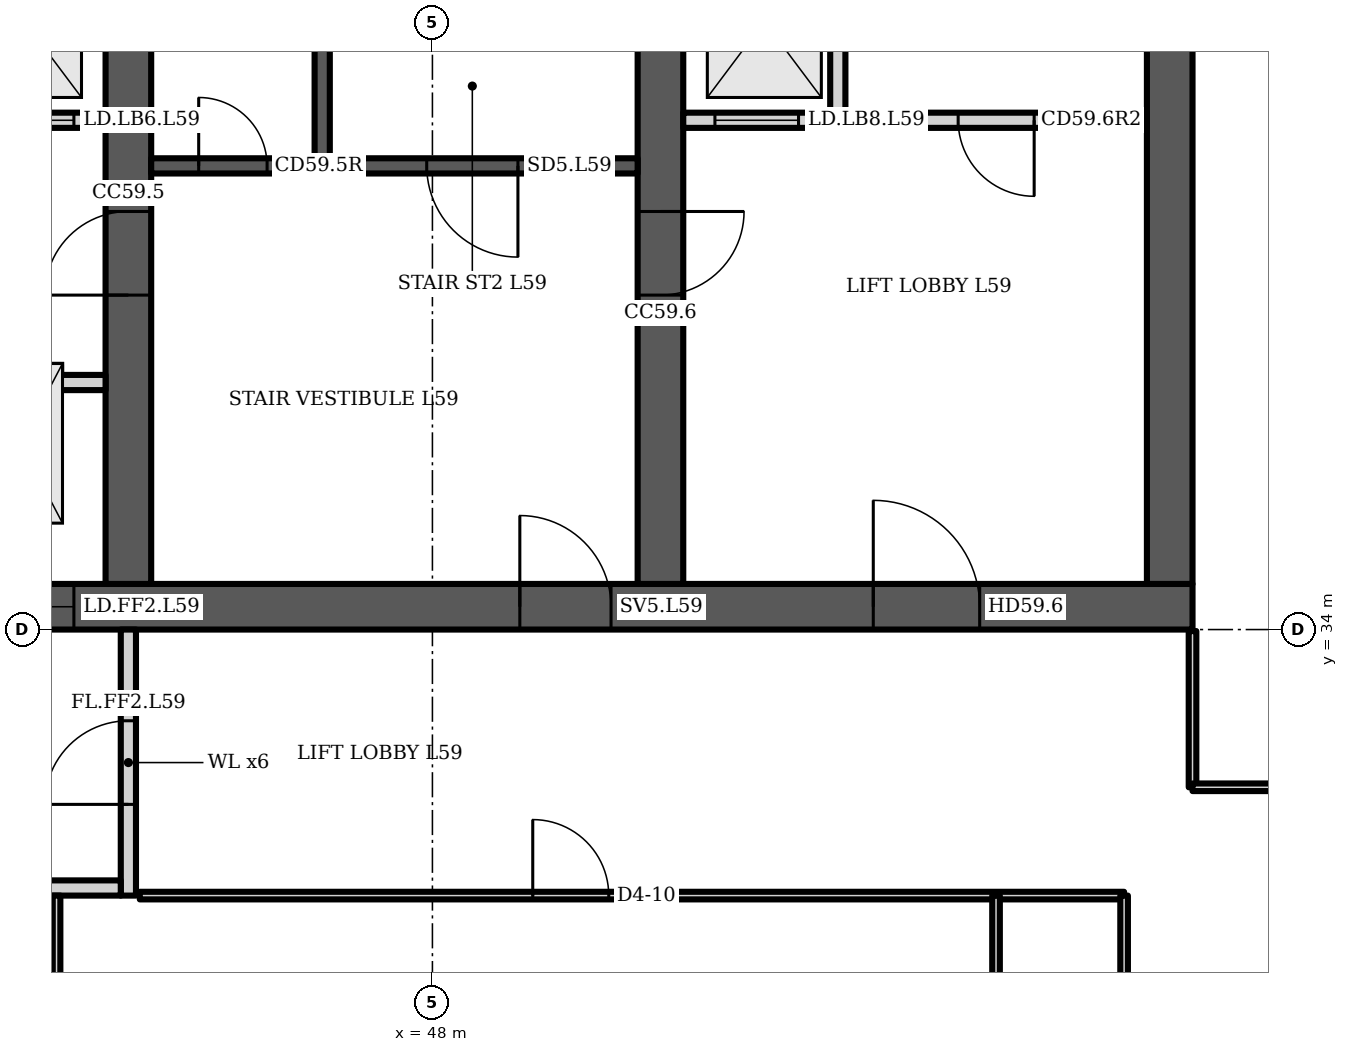
"""IFC4 building model, lengths in metres.
Left out: names, types, materials, properties, quantities, classifications, styles, units other than length and angle.
Written with IfcOpenShell. Run it as: python <this file> out.ifc"""

import sys

from ifc_helpers import new_model, si_unit, direction, frame, frame_2d, origin, place, context, subcontext, project, spatial, polyline, rectangle, outline, extrude, element, fill, save


model = new_model("IFC4")
c1 = context("Model", 3, precision=1e-05, world=origin(), true_north=direction((0.0, 1.0)))
c2 = subcontext(c1, "Body", "Model", "MODEL_VIEW")
j1 = project(units=[si_unit("LENGTHUNIT", "METRE"), si_unit("PLANEANGLEUNIT", "RADIAN")], contexts=[c1])
p1 = place(None, origin())
s1 = spatial("IfcSite", under=j1, at=p1, CompositionType="ELEMENT")
p2 = place(p1, origin())
s2 = spatial("IfcBuilding", under=s1, at=p2, CompositionType="ELEMENT")
p3 = place(p2, frame((0.0, 0.0, 235.9)))
s3 = spatial("IfcBuildingStorey", under=s2, at=p3, CompositionType="ELEMENT", Elevation=235.9)
p4 = place(p3, frame((23.0, 34.3, 0.0), z_axis=(0.0, 0.0, 1.0), x_axis=(1.0, 0.0, 0.0)))
e1 = element("IfcWall", 1, at=p4, inside=s3, PredefinedType="SHEAR", context=c2, shape_type="SweptSolid", body=[
    extrude(rectangle(XDim=35.0, YDim=0.6, at=frame_2d((17.5, 0.0))), origin(), (0.0, 0.0, 1.0), 3.6),
])
p5 = place(p4, frame((0.65, 0.0, 0.0)))
e2 = element("IfcOpeningElement", 2, at=p5, cuts=e1, PredefinedType="OPENING", context=c2, shape_type="SweptSolid", body=[
    extrude(rectangle(XDim=1.2, YDim=2.1, at=frame_2d((0.6, 1.05))), frame((0.0, 0.31, 0.0), z_axis=(0.0, -1.0, 0.0), x_axis=(1.0, 0.0, 0.0)), (0.0, 0.0, 1.0), 0.62),
])
p6 = place(p4, frame((7.717, 0.0, 0.0)))
e3 = element("IfcOpeningElement", 3, at=p6, cuts=e1, PredefinedType="OPENING", context=c2, shape_type="SweptSolid", body=[
    extrude(rectangle(XDim=1.1, YDim=2.1, at=frame_2d((0.55, 1.05))), frame((0.0, 0.31, 0.0), z_axis=(0.0, -1.0, 0.0), x_axis=(1.0, 0.0, 0.0)), (0.0, 0.0, 1.0), 0.62),
])
p7 = place(p4, frame((12.183, 0.0, 0.0)))
e4 = element("IfcOpeningElement", 4, at=p7, cuts=e1, PredefinedType="OPENING", context=c2, shape_type="SweptSolid", body=[
    extrude(rectangle(XDim=1.1, YDim=2.1, at=frame_2d((0.55, 1.05))), frame((0.0, 0.31, 0.0), z_axis=(0.0, -1.0, 0.0), x_axis=(1.0, 0.0, 0.0)), (0.0, 0.0, 1.0), 0.62),
])
p8 = place(p4, frame((9.8, 0.0, 0.0)))
e5 = element("IfcOpeningElement", 5, at=p8, cuts=e1, PredefinedType="OPENING", context=c2, shape_type="SweptSolid", body=[
    extrude(rectangle(XDim=1.4, YDim=2.1, at=frame_2d((0.7, 1.05))), frame((0.0, 0.31, 0.0), z_axis=(0.0, -1.0, 0.0), x_axis=(1.0, 0.0, 0.0)), (0.0, 0.0, 1.0), 0.62),
])
p9 = place(p4, frame((14.717, 0.0, 0.0)))
e6 = element("IfcOpeningElement", 6, at=p9, cuts=e1, PredefinedType="OPENING", context=c2, shape_type="SweptSolid", body=[
    extrude(rectangle(XDim=1.1, YDim=2.1, at=frame_2d((0.55, 1.05))), frame((0.0, 0.31, 0.0), z_axis=(0.0, -1.0, 0.0), x_axis=(1.0, 0.0, 0.0)), (0.0, 0.0, 1.0), 0.62),
])
p10 = place(p4, frame((16.95, 0.0, 0.0)))
e7 = element("IfcOpeningElement", 7, at=p10, cuts=e1, PredefinedType="OPENING", context=c2, shape_type="SweptSolid", body=[
    extrude(rectangle(XDim=1.1, YDim=2.1, at=frame_2d((0.55, 1.05))), frame((0.0, 0.31, 0.0), z_axis=(0.0, -1.0, 0.0), x_axis=(1.0, 0.0, 0.0)), (0.0, 0.0, 1.0), 0.62),
])
p11 = place(p4, frame((19.183, 0.0, 0.0)))
e8 = element("IfcOpeningElement", 8, at=p11, cuts=e1, PredefinedType="OPENING", context=c2, shape_type="SweptSolid", body=[
    extrude(rectangle(XDim=1.1, YDim=2.1, at=frame_2d((0.55, 1.05))), frame((0.0, 0.31, 0.0), z_axis=(0.0, -1.0, 0.0), x_axis=(1.0, 0.0, 0.0)), (0.0, 0.0, 1.0), 0.62),
])
p12 = place(p4, frame((26.15, 0.0, 0.0)))
e9 = element("IfcOpeningElement", 9, at=p12, cuts=e1, PredefinedType="OPENING", context=c2, shape_type="SweptSolid", body=[
    extrude(rectangle(XDim=1.2, YDim=2.1, at=frame_2d((0.6, 1.05))), frame((0.0, 0.31, 0.0), z_axis=(0.0, -1.0, 0.0), x_axis=(1.0, 0.0, 0.0)), (0.0, 0.0, 1.0), 0.62),
])
p13 = place(p4, frame((30.8, 0.0, 0.0)))
e10 = element("IfcOpeningElement", 10, at=p13, cuts=e1, PredefinedType="OPENING", context=c2, shape_type="SweptSolid", body=[
    extrude(rectangle(XDim=1.4, YDim=2.1, at=frame_2d((0.7, 1.05))), frame((0.0, 0.31, 0.0), z_axis=(0.0, -1.0, 0.0), x_axis=(1.0, 0.0, 0.0)), (0.0, 0.0, 1.0), 0.62),
])
p14 = place(p3, frame((44.0, 34.6, 0.0), z_axis=(0.0, 0.0, 1.0), x_axis=(0.0, 1.0, 0.0)))
e11 = element("IfcWall", 11, at=p14, inside=s3, PredefinedType="SHEAR", context=c2, shape_type="SweptSolid", body=[
    extrude(rectangle(XDim=14.784, YDim=0.6, at=frame_2d((7.392, 0.0))), origin(), (0.0, 0.0, 1.0), 3.6),
])
p15 = place(p14, frame((11.608, 0.0, 0.0)))
e12 = element("IfcOpeningElement", 12, at=p15, cuts=e11, PredefinedType="OPENING", context=c2, shape_type="SweptSolid", body=[
    extrude(rectangle(XDim=1.0, YDim=2.1, at=frame_2d((0.5, 1.05))), frame((0.0, 0.31, 0.0), z_axis=(0.0, -1.0, 0.0), x_axis=(1.0, 0.0, 0.0)), (0.0, 0.0, 1.0), 0.62),
])
p16 = place(p14, frame((3.8, 0.0, 0.0)))
e13 = element("IfcOpeningElement", 13, at=p16, cuts=e11, PredefinedType="OPENING", context=c2, shape_type="SweptSolid", body=[
    extrude(rectangle(XDim=1.1, YDim=2.1, at=frame_2d((0.55, 1.05))), frame((0.0, 0.31, 0.0), z_axis=(0.0, -1.0, 0.0), x_axis=(1.0, 0.0, 0.0)), (0.0, 0.0, 1.0), 0.62),
])
p17 = place(p3, frame((51.0, 34.6, 0.0), z_axis=(0.0, 0.0, 1.0), x_axis=(0.0, 1.0, 0.0)))
e14 = element("IfcWall", 14, at=p17, inside=s3, PredefinedType="SHEAR", context=c2, shape_type="SweptSolid", body=[
    extrude(rectangle(XDim=14.171, YDim=0.6, at=frame_2d((7.085, 0.0))), origin(), (0.0, 0.0, 1.0), 3.6),
])
p18 = place(p17, frame((3.8, 0.0, 0.0)))
e15 = element("IfcOpeningElement", 15, at=p18, cuts=e14, PredefinedType="OPENING", context=c2, shape_type="SweptSolid", body=[
    extrude(rectangle(XDim=1.1, YDim=2.1, at=frame_2d((0.55, 1.05))), frame((0.0, 0.31, 0.0), z_axis=(0.0, -1.0, 0.0), x_axis=(1.0, 0.0, 0.0)), (0.0, 0.0, 1.0), 0.62),
])
p19 = place(p3, frame((57.7, 34.6, 0.0), z_axis=(0.0, 0.0, 1.0), x_axis=(0.0, 1.0, 0.0)))
e16 = element("IfcWall", 16, at=p19, inside=s3, PredefinedType="SHEAR", context=c2, shape_type="SweptSolid", body=[
    extrude(rectangle(XDim=13.585, YDim=0.6, at=frame_2d((6.792, 0.0))), origin(), (0.0, 0.0, 1.0), 3.6),
])
p20 = place(p3, frame((37.3, 40.7, 0.0), z_axis=(0.0, 0.0, 1.0), x_axis=(1.0, 0.0, 0.0)))
e17 = element("IfcWall", 17, at=p20, inside=s3, PredefinedType="PARTITIONING", context=c2, shape_type="SweptSolid", body=[
    extrude(rectangle(XDim=6.4, YDim=0.2, at=frame_2d((3.2, 0.0))), origin(), (0.0, 0.0, 1.0), 3.2),
])
p21 = place(p20, frame((0.417, 0.0, 0.0)))
e18 = element("IfcOpeningElement", 18, at=p21, cuts=e17, PredefinedType="OPENING", context=c2, shape_type="SweptSolid", body=[
    extrude(rectangle(XDim=1.1, YDim=2.1, at=frame_2d((0.55, 1.05))), frame((0.0, 0.11, 0.0), z_axis=(0.0, -1.0, 0.0), x_axis=(1.0, 0.0, 0.0)), (0.0, 0.0, 1.0), 0.22),
])
p22 = place(p20, frame((2.65, 0.0, 0.0)))
e19 = element("IfcOpeningElement", 19, at=p22, cuts=e17, PredefinedType="OPENING", context=c2, shape_type="SweptSolid", body=[
    extrude(rectangle(XDim=1.1, YDim=2.1, at=frame_2d((0.55, 1.05))), frame((0.0, 0.11, 0.0), z_axis=(0.0, -1.0, 0.0), x_axis=(1.0, 0.0, 0.0)), (0.0, 0.0, 1.0), 0.22),
])
p23 = place(p20, frame((4.883, 0.0, 0.0)))
e20 = element("IfcOpeningElement", 20, at=p23, cuts=e17, PredefinedType="OPENING", context=c2, shape_type="SweptSolid", body=[
    extrude(rectangle(XDim=1.1, YDim=2.1, at=frame_2d((0.55, 1.05))), frame((0.0, 0.11, 0.0), z_axis=(0.0, -1.0, 0.0), x_axis=(1.0, 0.0, 0.0)), (0.0, 0.0, 1.0), 0.22),
])
p24 = place(p3, origin())
e21 = element("IfcWall", 21, at=p24, inside=s3, PredefinedType="PARTITIONING", context=c2, shape_type="SweptSolid", body=[
    extrude(outline(polyline([(41.567, 37.1), (39.433, 37.1), (39.433, 34.6), (39.233, 34.6), (39.233, 37.45), (37.3, 37.45), (37.3, 37.65), (39.233, 37.65), (39.433, 37.65), (39.433, 37.3), (41.567, 37.3), (41.567, 37.35), (41.767, 37.35), (43.7, 37.35), (43.7, 37.15), (41.767, 37.15), (41.767, 34.6), (41.567, 34.6), (41.567, 37.1)])), origin(), (0.0, 0.0, 1.0), 3.2),
])
p25 = place(p3, origin())
e22 = element("IfcWall", 22, at=p25, inside=s3, PredefinedType="PARTITIONING", context=c2, shape_type="SweptSolid", body=[
    extrude(outline(polyline([(39.433, 40.8), (39.233, 40.8), (39.233, 43.8), (37.3, 43.8), (37.3, 44.0), (43.7, 44.0), (43.7, 43.8), (41.767, 43.8), (41.767, 40.8), (41.567, 40.8), (41.567, 43.8), (39.433, 43.8), (39.433, 40.8)])), origin(), (0.0, 0.0, 1.0), 3.2),
])
p26 = place(p3, frame((44.3, 40.1, 0.0), z_axis=(0.0, 0.0, 1.0), x_axis=(1.0, 0.0, 0.0)))
e23 = element("IfcWall", 23, at=p26, inside=s3, PredefinedType="SHEAR", context=c2, shape_type="SweptSolid", body=[
    extrude(rectangle(XDim=6.4, YDim=0.2, at=frame_2d((3.2, 0.0))), origin(), (0.0, 0.0, 1.0), 3.2),
])
p27 = place(p26, frame((3.625, 0.0, 0.0)))
e24 = element("IfcOpeningElement", 24, at=p27, cuts=e23, PredefinedType="OPENING", context=c2, shape_type="SweptSolid", body=[
    extrude(rectangle(XDim=1.2, YDim=2.1, at=frame_2d((0.6, 1.05))), frame((0.0, 0.11, 0.0), z_axis=(0.0, -1.0, 0.0), x_axis=(1.0, 0.0, 0.0)), (0.0, 0.0, 1.0), 0.22),
])
p28 = place(p26, frame((0.625, 0.0, 0.0)))
e25 = element("IfcOpeningElement", 25, at=p28, cuts=e23, PredefinedType="OPENING", context=c2, shape_type="SweptSolid", body=[
    extrude(rectangle(XDim=0.9, YDim=2.1, at=frame_2d((0.45, 1.05))), frame((0.0, 0.11, 0.0), z_axis=(0.0, -1.0, 0.0), x_axis=(1.0, 0.0, 0.0)), (0.0, 0.0, 1.0), 0.22),
])
p29 = place(p3, frame((46.55, 40.2, 0.0), z_axis=(0.0, 0.0, 1.0), x_axis=(0.0, 1.0, 0.0)))
e26 = element("IfcWall", 26, at=p29, inside=s3, PredefinedType="SHEAR", context=c2, shape_type="SweptSolid", body=[
    extrude(rectangle(XDim=7.2, YDim=0.2, at=frame_2d((3.6, 0.0))), origin(), (0.0, 0.0, 1.0), 3.2),
])
p30 = place(p3, frame((51.3, 40.7, 0.0), z_axis=(0.0, 0.0, 1.0), x_axis=(1.0, 0.0, 0.0)))
e27 = element("IfcWall", 27, at=p30, inside=s3, PredefinedType="PARTITIONING", context=c2, shape_type="SweptSolid", body=[
    extrude(rectangle(XDim=6.1, YDim=0.2, at=frame_2d((3.05, 0.0))), origin(), (0.0, 0.0, 1.0), 3.2),
])
p31 = place(p30, frame((0.417, 0.0, 0.0)))
e28 = element("IfcOpeningElement", 28, at=p31, cuts=e27, PredefinedType="OPENING", context=c2, shape_type="SweptSolid", body=[
    extrude(rectangle(XDim=1.1, YDim=2.1, at=frame_2d((0.55, 1.05))), frame((0.0, 0.11, 0.0), z_axis=(0.0, -1.0, 0.0), x_axis=(1.0, 0.0, 0.0)), (0.0, 0.0, 1.0), 0.22),
])
p32 = place(p30, frame((3.617, 0.0, 0.0)))
e29 = element("IfcOpeningElement", 29, at=p32, cuts=e27, PredefinedType="OPENING", context=c2, shape_type="SweptSolid", body=[
    extrude(rectangle(XDim=1.0, YDim=2.1, at=frame_2d((0.5, 1.05))), frame((0.0, 0.11, 0.0), z_axis=(0.0, -1.0, 0.0), x_axis=(1.0, 0.0, 0.0)), (0.0, 0.0, 1.0), 0.22),
])
p33 = place(p3, origin())
e30 = element("IfcWall", 30, at=p33, inside=s3, PredefinedType="PARTITIONING", context=c2, shape_type="SweptSolid", body=[
    extrude(outline(polyline([(53.433, 40.8), (53.433, 43.8), (53.233, 43.8), (53.233, 40.8), (53.433, 40.8)])), origin(), (0.0, 0.0, 1.0), 3.2),
])
p34 = place(p3, frame((44.0, 30.5, 0.0), z_axis=(0.0, 0.0, 1.0), x_axis=(0.0, 1.0, 0.0)))
e31 = element("IfcWall", 31, at=p34, inside=s3, PredefinedType="PARTITIONING", context=c2, shape_type="SweptSolid", body=[
    extrude(rectangle(XDim=3.5, YDim=0.2, at=frame_2d((1.75, 0.0))), origin(), (0.0, 0.0, 1.0), 3.2),
])
p35 = place(p34, frame((1.2, 0.0, 0.0)))
e32 = element("IfcOpeningElement", 32, at=p35, cuts=e31, PredefinedType="OPENING", context=c2, shape_type="SweptSolid", body=[
    extrude(rectangle(XDim=1.1, YDim=2.1, at=frame_2d((0.55, 1.05))), frame((0.0, 0.11, 0.0), z_axis=(0.0, -1.0, 0.0), x_axis=(1.0, 0.0, 0.0)), (0.0, 0.0, 1.0), 0.22),
])
p36 = place(p3, frame((41.1, 30.6, 0.0), z_axis=(0.0, 0.0, 1.0), x_axis=(1.0, 0.0, 0.0)))
e33 = element("IfcWall", 33, at=p36, inside=s3, PredefinedType="PARTITIONING", context=c2, shape_type="SweptSolid", body=[
    extrude(rectangle(XDim=2.8, YDim=0.2, at=frame_2d((1.4, 0.0))), origin(), (0.0, 0.0, 1.0), 3.2),
])
p37 = place(p3, frame((43.055, 14.86, 0.0), z_axis=(0.0, 0.0, 1.0), x_axis=(0.0, 1.0, 0.0)))
e34 = element("IfcWall", 34, at=p37, inside=s3, PredefinedType="PARTITIONING", context=c2, shape_type="SweptSolid", body=[
    extrude(rectangle(XDim=15.64, YDim=0.1, at=frame_2d((7.82, 0.0))), origin(), (0.0, 0.0, 1.0), 3.2),
])
p38 = place(p37, frame((4.05, 0.0, 0.0)))
e35 = element("IfcOpeningElement", 35, at=p38, cuts=e34, PredefinedType="OPENING", context=c2, shape_type="SweptSolid", body=[
    extrude(rectangle(XDim=1.1, YDim=2.1, at=frame_2d((0.55, 1.05))), frame((0.0, 0.06, 0.0), z_axis=(0.0, -1.0, 0.0), x_axis=(1.0, 0.0, 0.0)), (0.0, 0.0, 1.0), 0.12),
])
p39 = place(p3, frame((44.15, 30.5, 0.0), z_axis=(0.0, 0.0, 1.0), x_axis=(1.0, 0.0, 0.0)))
e36 = element("IfcWall", 36, at=p39, inside=s3, PredefinedType="PARTITIONING", context=c2, shape_type="SweptSolid", body=[
    extrude(rectangle(XDim=12.95, YDim=0.1, at=frame_2d((6.475, 0.0))), origin(), (0.0, 0.0, 1.0), 3.2),
])
p40 = place(p39, frame((5.17, 0.0, 0.0)))
e37 = element("IfcOpeningElement", 37, at=p40, cuts=e36, PredefinedType="OPENING", context=c2, shape_type="SweptSolid", body=[
    extrude(rectangle(XDim=1.0, YDim=2.1, at=frame_2d((0.5, 1.05))), frame((0.0, 0.06, 0.0), z_axis=(0.0, -1.0, 0.0), x_axis=(1.0, 0.0, 0.0)), (0.0, 0.0, 1.0), 0.12),
])
p41 = place(p3, frame((55.415, 4.345, 0.0), z_axis=(0.0, 0.0, 1.0), x_axis=(0.0, 1.0, 0.0)))
e38 = element("IfcWall", 38, at=p41, inside=s3, PredefinedType="PARTITIONING", context=c2, shape_type="SweptSolid", body=[
    extrude(rectangle(XDim=26.155, YDim=0.1, at=frame_2d((13.078, 0.0))), origin(), (0.0, 0.0, 1.0), 3.2),
])
p42 = place(p3, frame((57.1, 14.345, 0.0), z_axis=(0.0, 0.0, 1.0), x_axis=(0.0, 1.0, 0.0)))
e39 = element("IfcWall", 39, at=p42, inside=s3, PredefinedType="PARTITIONING", context=c2, shape_type="SweptSolid", body=[
    extrude(rectangle(XDim=16.155, YDim=0.1, at=frame_2d((8.078, 0.0))), origin(), (0.0, 0.0, 1.0), 3.2),
])
p43 = place(p42, frame((5.215, 0.0, 0.0)))
e40 = element("IfcOpeningElement", 40, at=p43, cuts=e39, PredefinedType="OPENING", context=c2, shape_type="SweptSolid", body=[
    extrude(rectangle(XDim=1.0, YDim=2.1, at=frame_2d((0.5, 1.05))), frame((0.0, 0.06, 0.0), z_axis=(0.0, -1.0, 0.0), x_axis=(1.0, 0.0, 0.0)), (0.0, 0.0, 1.0), 0.12),
])
p44 = place(p3, frame((58.0, 31.925, 0.0), z_axis=(0.0, 0.0, 1.0), x_axis=(0.0, 1.0, 0.0)))
e41 = element("IfcWall", 41, at=p44, inside=s3, PredefinedType="PARTITIONING", context=c2, shape_type="SweptSolid", body=[
    extrude(rectangle(XDim=2.055, YDim=0.1, at=frame_2d((1.027, 0.0))), origin(), (0.0, 0.0, 1.0), 3.2),
])
p45 = place(p3, frame((58.0, 31.925, 0.0), z_axis=(0.0, 0.0, 1.0), x_axis=(1.0, 0.0, 0.0)))
e42 = element("IfcWall", 42, at=p45, inside=s3, PredefinedType="PARTITIONING", context=c2, shape_type="SweptSolid", body=[
    extrude(rectangle(XDim=1.425, YDim=0.1, at=frame_2d((0.712, 0.0))), origin(), (0.0, 0.0, 1.0), 3.2),
])
p46 = place(p3, frame((58.9, 27.435, 0.0), z_axis=(0.0, 0.0, 1.0), x_axis=(0.178584, 0.983924, 0.0)))
e43 = element("IfcWall", 43, at=p46, inside=s3, PredefinedType="PARTITIONING", context=c2, shape_type="SweptSolid", body=[
    extrude(rectangle(XDim=2.353, YDim=0.1, at=frame_2d((1.176, 0.0))), origin(), (0.0, 0.0, 1.0), 3.2),
])
p47 = place(p11, origin())
e44 = element("IfcDoor", 44, at=p47, inside=s3, OperationType="DOUBLE_DOOR_SLIDING", PredefinedType="DOOR", context=c2, shape_type="SweptSolid", body=[
    extrude(rectangle(XDim=1.1, YDim=2.1, at=frame_2d((0.55, 1.05))), frame((0.0, 0.025, 0.0), z_axis=(0.0, -1.0, 0.0), x_axis=(1.0, 0.0, 0.0)), (0.0, 0.0, 1.0), 0.05),
])
fill(e8, e44)
p48 = place(p23, origin())
e45 = element("IfcDoor", 45, at=p48, inside=s3, OperationType="DOUBLE_DOOR_SLIDING", PredefinedType="DOOR", context=c2, shape_type="SweptSolid", body=[
    extrude(rectangle(XDim=1.1, YDim=2.1, at=frame_2d((0.55, 1.05))), frame((0.0, 0.025, 0.0), z_axis=(0.0, -1.0, 0.0), x_axis=(1.0, 0.0, 0.0)), (0.0, 0.0, 1.0), 0.05),
])
fill(e20, e45)
p49 = place(p27, origin())
e46 = element("IfcDoor", 46, at=p49, inside=s3, OperationType="SINGLE_SWING_RIGHT", PredefinedType="DOOR", context=c2, shape_type="SweptSolid", body=[
    extrude(rectangle(XDim=1.2, YDim=2.1, at=frame_2d((0.6, 1.05))), frame((0.0, 0.025, 0.0), z_axis=(0.0, -1.0, 0.0), x_axis=(1.0, 0.0, 0.0)), (0.0, 0.0, 1.0), 0.05),
])
fill(e24, e46)
p50 = place(p28, origin())
e47 = element("IfcDoor", 47, at=p50, inside=s3, OperationType="SINGLE_SWING_LEFT", PredefinedType="DOOR", context=c2, shape_type="SweptSolid", body=[
    extrude(rectangle(XDim=0.9, YDim=2.1, at=frame_2d((0.45, 1.05))), frame((0.0, 0.025, 0.0), z_axis=(0.0, -1.0, 0.0), x_axis=(1.0, 0.0, 0.0)), (0.0, 0.0, 1.0), 0.05),
])
fill(e25, e47)
p51 = place(p12, origin())
e48 = element("IfcDoor", 48, at=p51, inside=s3, OperationType="SINGLE_SWING_LEFT", PredefinedType="DOOR", context=c2, shape_type="SweptSolid", body=[
    extrude(rectangle(XDim=1.2, YDim=2.1, at=frame_2d((0.6, 1.05))), frame((0.0, 0.025, 0.0), z_axis=(0.0, -1.0, 0.0), x_axis=(1.0, 0.0, 0.0)), (0.0, 0.0, 1.0), 0.05),
])
fill(e9, e48)
p52 = place(p13, origin())
e49 = element("IfcDoor", 49, at=p52, inside=s3, OperationType="DOUBLE_DOOR_SINGLE_SWING", PredefinedType="DOOR", context=c2, shape_type="SweptSolid", body=[
    extrude(rectangle(XDim=1.4, YDim=2.1, at=frame_2d((0.7, 1.05))), frame((0.0, 0.025, 0.0), z_axis=(0.0, -1.0, 0.0), x_axis=(1.0, 0.0, 0.0)), (0.0, 0.0, 1.0), 0.05),
])
fill(e10, e49)
p53 = place(p31, origin())
e50 = element("IfcDoor", 50, at=p53, inside=s3, OperationType="DOUBLE_DOOR_SLIDING", PredefinedType="DOOR", context=c2, shape_type="SweptSolid", body=[
    extrude(rectangle(XDim=1.1, YDim=2.1, at=frame_2d((0.55, 1.05))), frame((0.0, 0.025, 0.0), z_axis=(0.0, -1.0, 0.0), x_axis=(1.0, 0.0, 0.0)), (0.0, 0.0, 1.0), 0.05),
])
fill(e28, e50)
p54 = place(p32, origin())
e51 = element("IfcDoor", 51, at=p54, inside=s3, OperationType="SINGLE_SWING_RIGHT", PredefinedType="DOOR", context=c2, shape_type="SweptSolid", body=[
    extrude(rectangle(XDim=1.0, YDim=2.1, at=frame_2d((0.5, 1.05))), frame((0.0, 0.025, 0.0), z_axis=(0.0, -1.0, 0.0), x_axis=(1.0, 0.0, 0.0)), (0.0, 0.0, 1.0), 0.05),
])
fill(e29, e51)
p55 = place(p16, origin())
e52 = element("IfcDoor", 52, at=p55, inside=s3, OperationType="SINGLE_SWING_LEFT", PredefinedType="DOOR", context=c2, shape_type="SweptSolid", body=[
    extrude(rectangle(XDim=1.1, YDim=2.1, at=frame_2d((0.55, 1.05))), frame((0.0, 0.025, 0.0), z_axis=(0.0, -1.0, 0.0), x_axis=(1.0, 0.0, 0.0)), (0.0, 0.0, 1.0), 0.05),
])
fill(e13, e52)
p56 = place(p18, origin())
e53 = element("IfcDoor", 53, at=p56, inside=s3, OperationType="SINGLE_SWING_RIGHT", PredefinedType="DOOR", context=c2, shape_type="SweptSolid", body=[
    extrude(rectangle(XDim=1.1, YDim=2.1, at=frame_2d((0.55, 1.05))), frame((0.0, 0.025, 0.0), z_axis=(0.0, -1.0, 0.0), x_axis=(1.0, 0.0, 0.0)), (0.0, 0.0, 1.0), 0.05),
])
fill(e15, e53)
p57 = place(p35, origin())
e54 = element("IfcDoor", 54, at=p57, inside=s3, OperationType="SINGLE_SWING_LEFT", PredefinedType="DOOR", context=c2, shape_type="SweptSolid", body=[
    extrude(rectangle(XDim=1.1, YDim=2.1, at=frame_2d((0.55, 1.05))), frame((0.0, 0.025, 0.0), z_axis=(0.0, -1.0, 0.0), x_axis=(1.0, 0.0, 0.0)), (0.0, 0.0, 1.0), 0.05),
])
fill(e32, e54)
p58 = place(p40, origin())
e55 = element("IfcDoor", 55, at=p58, inside=s3, OperationType="SINGLE_SWING_LEFT", PredefinedType="DOOR", context=c2, shape_type="SweptSolid", body=[
    extrude(rectangle(XDim=1.0, YDim=2.1, at=frame_2d((0.5, 1.05))), frame((0.0, 0.025, 0.0), z_axis=(0.0, -1.0, 0.0), x_axis=(1.0, 0.0, 0.0)), (0.0, 0.0, 1.0), 0.05),
])
fill(e37, e55)
save(model, sys.argv[1])
